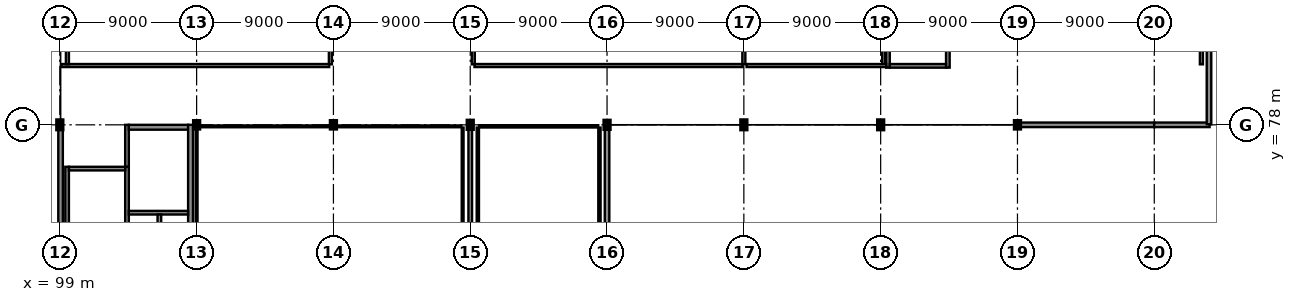
"""IFC4 building model, lengths in metres.
Left out: names, types, materials, properties, quantities, classifications, styles, units other than length and angle.
Written with IfcOpenShell. Run it as: python <this file> out.ifc"""

import sys

from ifc_helpers import new_model, si_unit, direction, frame, frame_2d, origin, origin_2d, place, context, subcontext, project, spatial, rectangle, i_section, extrude, element, fill, save


model = new_model("IFC4")
c1 = context("Model", 3, precision=1e-05, world=origin(), true_north=direction((0.0, 1.0)))
c2 = subcontext(c1, "Body", "Model", "MODEL_VIEW")
j1 = project(units=[si_unit("LENGTHUNIT", "METRE"), si_unit("PLANEANGLEUNIT", "RADIAN")], contexts=[c1])
p1 = place(None, origin())
s1 = spatial("IfcSite", under=j1, at=p1, CompositionType="ELEMENT")
p2 = place(p1, origin())
s2 = spatial("IfcBuilding", under=s1, at=p2, CompositionType="ELEMENT")
p3 = place(p2, frame((0.0, 0.0, 14.4)))
s3 = spatial("IfcBuildingStorey", under=s2, at=p3, CompositionType="ELEMENT", Elevation=14.4)
p4 = place(p3, frame((99.0, 78.0, 0.0), z_axis=(0.0, 0.0, 1.0), x_axis=(1.0, 0.0, 0.0)))
e1 = element("IfcColumn", 1, at=p4, inside=s3, PredefinedType="COLUMN", context=c2, shape_type="SweptSolid", body=[
    extrude(i_section(OverallWidth=0.3, OverallDepth=0.55, WebThickness=0.015, FlangeThickness=0.029, at=origin_2d()), origin(), (0.0, 0.0, 1.0), 4.5),
])
for number, where, z_axis, x_axis in (
    (2, (108.0, 78.0, 0.0), (0.0, 0.0, 1.0), (0.0, 1.0, 0.0)),
    (3, (117.0, 78.0, 0.0), (0.0, 0.0, 1.0), (1.0, 0.0, 0.0)),
):
    element("IfcColumn", number, at=place(p3, frame(where, z_axis=z_axis, x_axis=x_axis)), inside=s3, PredefinedType="COLUMN", context=c2, shape_type="SweptSolid", body=[
        extrude(i_section(OverallWidth=0.3, OverallDepth=0.45, WebThickness=0.014, FlangeThickness=0.026, at=origin_2d()), origin(), (0.0, 0.0, 1.0), 4.5),
    ])
for number, where, z_axis, x_axis in (
    (4, (126.0, 78.0, 0.0), (0.0, 0.0, 1.0), (1.0, 0.0, 0.0)),
    (5, (135.0, 78.0, 0.0), (0.0, 0.0, 1.0), (1.0, 0.0, 0.0)),
):
    element("IfcColumn", number, at=place(p3, frame(where, z_axis=z_axis, x_axis=x_axis)), inside=s3, PredefinedType="COLUMN", context=c2, shape_type="SweptSolid", body=[
        extrude(i_section(OverallWidth=0.3, OverallDepth=0.5, WebThickness=0.014, FlangeThickness=0.028, at=origin_2d()), origin(), (0.0, 0.0, 1.0), 4.5),
    ])
for number, where, z_axis, x_axis in (
    (6, (144.0, 78.0, 0.0), (0.0, 0.0, 1.0), (1.0, 0.0, 0.0)),
    (7, (153.0, 78.0, 0.0), (0.0, 0.0, 1.0), (0.0, 1.0, 0.0)),
):
    element("IfcColumn", number, at=place(p3, frame(where, z_axis=z_axis, x_axis=x_axis)), inside=s3, PredefinedType="COLUMN", context=c2, shape_type="SweptSolid", body=[
        extrude(i_section(OverallWidth=0.3, OverallDepth=0.55, WebThickness=0.015, FlangeThickness=0.029, at=origin_2d()), origin(), (0.0, 0.0, 1.0), 4.5),
    ])
p5 = place(p3, frame((162.0, 78.0, 0.0), z_axis=(0.0, 0.0, 1.0), x_axis=(1.0, 0.0, 0.0)))
e8 = element("IfcColumn", 8, at=p5, inside=s3, PredefinedType="COLUMN", context=c2, shape_type="SweptSolid", body=[
    extrude(i_section(OverallWidth=0.3, OverallDepth=0.45, WebThickness=0.014, FlangeThickness=0.026, at=origin_2d()), origin(), (0.0, 0.0, 1.0), 4.5),
])
p6 = place(p3, frame((135.0, 66.138, 0.0), z_axis=(0.0, 0.0, 1.0), x_axis=(0.0, 1.0, 0.0)))
e9 = element("IfcWall", 9, at=p6, inside=s3, PredefinedType="SOLIDWALL", context=c2, shape_type="SweptSolid", body=[
    extrude(rectangle(XDim=11.614, YDim=0.3, at=frame_2d((5.807, 0.0))), origin(), (0.0, 0.0, 1.0), 3.805),
])
p7 = place(p6, frame((2.252, 0.0, 0.85)))
e10 = element("IfcOpeningElement", 10, at=p7, cuts=e9, PredefinedType="OPENING", context=c2, shape_type="SweptSolid", body=[
    extrude(rectangle(XDim=2.0, YDim=2.0, at=frame_2d((1.0, 1.0))), frame((0.0, 0.165, 0.0), z_axis=(0.0, -1.0, 0.0), x_axis=(1.0, 0.0, 0.0)), (0.0, 0.0, 1.0), 0.33),
])
p8 = place(p6, frame((7.362, 0.0, 0.85)))
e11 = element("IfcOpeningElement", 11, at=p8, cuts=e9, PredefinedType="OPENING", context=c2, shape_type="SweptSolid", body=[
    extrude(rectangle(XDim=2.0, YDim=2.0, at=frame_2d((1.0, 1.0))), frame((0.0, 0.165, 0.0), z_axis=(0.0, -1.0, 0.0), x_axis=(1.0, 0.0, 0.0)), (0.0, 0.0, 1.0), 0.33),
])
p9 = place(p3, frame((162.008, 78.0, 0.0), z_axis=(0.0, 0.0, 1.0), x_axis=(1.0, 0.0, 0.0)))
e12 = element("IfcWall", 12, at=p9, inside=s3, PredefinedType="SOLIDWALL", context=c2, shape_type="SweptSolid", body=[
    extrude(rectangle(XDim=9.002, YDim=0.3, at=frame_2d((4.501, 0.0))), origin(), (0.0, 0.0, 1.0), 3.187),
])
p10 = place(p3, frame((170.99, 78.0, 0.0), z_axis=(0.0, 0.0, 1.0), x_axis=(1.0, 0.0, 0.0)))
e13 = element("IfcWall", 13, at=p10, inside=s3, PredefinedType="SOLIDWALL", context=c2, shape_type="SweptSolid", body=[
    extrude(rectangle(XDim=3.65, YDim=0.3, at=frame_2d((1.825, 0.0))), origin(), (0.0, 0.0, 1.0), 3.187),
])
p11 = place(p3, frame((174.6, 78.04, 0.0), z_axis=(0.0, 0.0, 1.0), x_axis=(0.0, 1.0, 0.0)))
e14 = element("IfcWall", 14, at=p11, inside=s3, PredefinedType="SOLIDWALL", context=c2, shape_type="SweptSolid", body=[
    extrude(rectangle(XDim=18.0, YDim=0.3, at=frame_2d((9.0, 0.0))), origin(), (0.0, 0.0, 1.0), 3.545),
])
p12 = place(p11, frame((4.1, 0.0, 0.85)))
e15 = element("IfcOpeningElement", 15, at=p12, cuts=e14, PredefinedType="OPENING", context=c2, shape_type="SweptSolid", body=[
    extrude(rectangle(XDim=2.0, YDim=2.0, at=frame_2d((1.0, 1.0))), frame((0.0, 0.165, 0.0), z_axis=(0.0, -1.0, 0.0), x_axis=(1.0, 0.0, 0.0)), (0.0, 0.0, 1.0), 0.33),
])
p13 = place(p11, frame((11.96, 0.0, 0.85)))
e16 = element("IfcOpeningElement", 16, at=p13, cuts=e14, PredefinedType="OPENING", context=c2, shape_type="SweptSolid", body=[
    extrude(rectangle(XDim=2.0, YDim=2.0, at=frame_2d((1.0, 1.0))), frame((0.0, 0.165, 0.0), z_axis=(0.0, -1.0, 0.0), x_axis=(1.0, 0.0, 0.0)), (0.0, 0.0, 1.0), 0.33),
])
p14 = place(p3, frame((99.05, 77.727, 0.0), z_axis=(0.0, 0.0, 1.0), x_axis=(0.0, -1.0, 0.0)))
e17 = element("IfcWall", 17, at=p14, inside=s3, PredefinedType="SOLIDWALL", context=c2, shape_type="SweptSolid", body=[
    extrude(rectangle(XDim=11.599, YDim=0.3, at=frame_2d((5.8, 0.0))), origin(), (0.0, 0.0, 1.0), 3.705),
])
p15 = place(p3, frame((99.48, 66.96, 0.0), z_axis=(0.0, 0.0, 1.0), x_axis=(0.0, 1.0, 0.0)))
e18 = element("IfcWall", 18, at=p15, inside=s3, PredefinedType="SHEAR", context=c2, shape_type="SweptSolid", body=[
    extrude(rectangle(XDim=8.28, YDim=0.24, at=frame_2d((4.14, 0.0))), origin(), (0.0, 0.0, 1.0), 4.31),
])
p16 = place(p3, frame((103.42, 66.96, 0.0), z_axis=(0.0, 0.0, 1.0), x_axis=(0.0, 1.0, 0.0)))
e19 = element("IfcWall", 19, at=p16, inside=s3, PredefinedType="SHEAR", context=c2, shape_type="SweptSolid", body=[
    extrude(rectangle(XDim=8.28, YDim=0.24, at=frame_2d((4.14, 0.0))), origin(), (0.0, 0.0, 1.0), 4.31),
])
p17 = place(p16, frame((6.49, 0.0, 0.0)))
e20 = element("IfcOpeningElement", 20, at=p17, cuts=e19, PredefinedType="OPENING", context=c2, shape_type="SweptSolid", body=[
    extrude(rectangle(XDim=1.3, YDim=2.2, at=frame_2d((0.65, 1.1))), frame((0.0, 0.135, 0.0), z_axis=(0.0, -1.0, 0.0), x_axis=(1.0, 0.0, 0.0)), (0.0, 0.0, 1.0), 0.27),
])
p18 = place(p3, frame((99.6, 75.12, 0.0), z_axis=(0.0, 0.0, 1.0), x_axis=(1.0, 0.0, 0.0)))
e21 = element("IfcWall", 21, at=p18, inside=s3, PredefinedType="SHEAR", context=c2, shape_type="SweptSolid", body=[
    extrude(rectangle(XDim=3.7, YDim=0.24, at=frame_2d((1.85, 0.0))), origin(), (0.0, 0.0, 1.0), 4.31),
])
p19 = place(p3, frame((153.48, 81.76, 0.0), z_axis=(0.0, 0.0, 1.0), x_axis=(0.0, 1.0, 0.0)))
e22 = element("IfcWall", 22, at=p19, inside=s3, PredefinedType="SHEAR", context=c2, shape_type="SweptSolid", body=[
    extrude(rectangle(XDim=8.28, YDim=0.24, at=frame_2d((4.14, 0.0))), origin(), (0.0, 0.0, 1.0), 4.31),
])
p20 = place(p3, frame((157.42, 81.76, 0.0), z_axis=(0.0, 0.0, 1.0), x_axis=(0.0, 1.0, 0.0)))
e23 = element("IfcWall", 23, at=p20, inside=s3, PredefinedType="SHEAR", context=c2, shape_type="SweptSolid", body=[
    extrude(rectangle(XDim=8.28, YDim=0.24, at=frame_2d((4.14, 0.0))), origin(), (0.0, 0.0, 1.0), 4.31),
])
p21 = place(p20, frame((0.49, 0.0, 0.0)))
e24 = element("IfcOpeningElement", 24, at=p21, cuts=e23, PredefinedType="OPENING", context=c2, shape_type="SweptSolid", body=[
    extrude(rectangle(XDim=1.3, YDim=2.2, at=frame_2d((0.65, 1.1))), frame((0.0, 0.135, 0.0), z_axis=(0.0, -1.0, 0.0), x_axis=(1.0, 0.0, 0.0)), (0.0, 0.0, 1.0), 0.27),
])
p22 = place(p3, frame((153.6, 81.88, 0.0), z_axis=(0.0, 0.0, 1.0), x_axis=(1.0, 0.0, 0.0)))
e25 = element("IfcWall", 25, at=p22, inside=s3, PredefinedType="SHEAR", context=c2, shape_type="SweptSolid", body=[
    extrude(rectangle(XDim=3.7, YDim=0.24, at=frame_2d((1.85, 0.0))), origin(), (0.0, 0.0, 1.0), 4.31),
])
p23 = place(p3, frame((103.42, 75.24, 0.0), z_axis=(0.0, 0.0, 1.0), x_axis=(0.0, 1.0, 0.0)))
e26 = element("IfcWall", 26, at=p23, inside=s3, PredefinedType="SHEAR", context=c2, shape_type="SweptSolid", body=[
    extrude(rectangle(XDim=2.76, YDim=0.24, at=frame_2d((1.38, 0.0))), origin(), (0.0, 0.0, 1.0), 4.16),
])
p24 = place(p3, frame((103.54, 77.84, 0.0), z_axis=(0.0, 0.0, 1.0), x_axis=(1.0, 0.0, 0.0)))
e27 = element("IfcWall", 27, at=p24, inside=s3, PredefinedType="SHEAR", context=c2, shape_type="SweptSolid", body=[
    extrude(rectangle(XDim=3.9, YDim=0.32, at=frame_2d((1.95, 0.0))), origin(), (0.0, 0.0, 1.0), 4.16),
])
p25 = place(p24, frame((1.225, 0.0, 0.0)))
e28 = element("IfcOpeningElement", 28, at=p25, cuts=e27, PredefinedType="OPENING", context=c2, shape_type="SweptSolid", body=[
    extrude(rectangle(XDim=1.45, YDim=2.2, at=frame_2d((0.725, 1.1))), frame((0.0, 0.175, 0.0), z_axis=(0.0, -1.0, 0.0), x_axis=(1.0, 0.0, 0.0)), (0.0, 0.0, 1.0), 0.35),
])
p26 = place(p3, frame((107.6, 68.96, 0.0), z_axis=(0.0, 0.0, 1.0), x_axis=(0.0, 1.0, 0.0)))
e29 = element("IfcWall", 29, at=p26, inside=s3, PredefinedType="SHEAR", context=c2, shape_type="SweptSolid", body=[
    extrude(rectangle(XDim=9.04, YDim=0.32, at=frame_2d((4.52, 0.0))), origin(), (0.0, 0.0, 1.0), 4.16),
])
p27 = place(p3, frame((103.54, 72.22, 0.0), z_axis=(0.0, 0.0, 1.0), x_axis=(1.0, 0.0, 0.0)))
e30 = element("IfcWall", 30, at=p27, inside=s3, PredefinedType="SHEAR", context=c2, shape_type="SweptSolid", body=[
    extrude(rectangle(XDim=3.9, YDim=0.24, at=frame_2d((1.95, 0.0))), origin(), (0.0, 0.0, 1.0), 4.31),
])
p28 = place(p27, frame((0.385, 0.0, 0.0)))
e31 = element("IfcOpeningElement", 31, at=p28, cuts=e30, PredefinedType="OPENING", context=c2, shape_type="SweptSolid", body=[
    extrude(rectangle(XDim=1.3, YDim=2.2, at=frame_2d((0.65, 1.1))), frame((0.0, 0.135, 0.0), z_axis=(0.0, -1.0, 0.0), x_axis=(1.0, 0.0, 0.0)), (0.0, 0.0, 1.0), 0.27),
])
p29 = place(p27, frame((2.335, 0.0, 0.0)))
e32 = element("IfcOpeningElement", 32, at=p29, cuts=e30, PredefinedType="OPENING", context=c2, shape_type="SweptSolid", body=[
    extrude(rectangle(XDim=1.3, YDim=2.2, at=frame_2d((0.65, 1.1))), frame((0.0, 0.135, 0.0), z_axis=(0.0, -1.0, 0.0), x_axis=(1.0, 0.0, 0.0)), (0.0, 0.0, 1.0), 0.27),
])
p30 = place(p3, frame((105.55, 69.2, 0.0), z_axis=(0.0, 0.0, 1.0), x_axis=(0.0, 1.0, 0.0)))
e33 = element("IfcWall", 33, at=p30, inside=s3, PredefinedType="SHEAR", context=c2, shape_type="SweptSolid", body=[
    extrude(rectangle(XDim=2.9, YDim=0.24, at=frame_2d((1.45, 0.0))), origin(), (0.0, 0.0, 1.0), 4.31),
])
p31 = place(p3, frame((126.0, 66.008, 0.0), z_axis=(0.0, 0.0, 1.0), x_axis=(0.0, 1.0, 0.0)))
e34 = element("IfcWall", 34, at=p31, inside=s3, PredefinedType="SHEAR", context=c2, shape_type="SweptSolid", body=[
    extrude(rectangle(XDim=11.744, YDim=0.24, at=frame_2d((5.872, 0.0))), origin(), (0.0, 0.0, 1.0), 3.845),
])
p32 = place(p3, frame((116.72, 81.9, 0.0), z_axis=(0.0, 0.0, 1.0), x_axis=(-1.0, 0.0, 0.0)))
e35 = element("IfcWall", 35, at=p32, inside=s3, PredefinedType="PARTITIONING", context=c2, shape_type="SweptSolid", body=[
    extrude(rectangle(XDim=17.595, YDim=0.2, at=frame_2d((8.797, 0.0))), origin(), (0.0, 0.0, 1.0), 4.14),
])
p33 = place(p32, frame((7.947, 0.0, 0.0)))
e36 = element("IfcOpeningElement", 36, at=p33, cuts=e35, PredefinedType="OPENING", context=c2, shape_type="SweptSolid", body=[
    extrude(rectangle(XDim=1.7, YDim=2.4, at=frame_2d((0.85, 1.2))), frame((0.0, 0.115, 0.0), z_axis=(0.0, -1.0, 0.0), x_axis=(1.0, 0.0, 0.0)), (0.0, 0.0, 1.0), 0.23),
])
p34 = place(p3, frame((99.5, 81.98, 0.0), z_axis=(0.0, 0.0, 1.0), x_axis=(0.0, 1.0, 0.0)))
e37 = element("IfcWall", 37, at=p34, inside=s3, PredefinedType="PARTITIONING", context=c2, shape_type="SweptSolid", body=[
    extrude(rectangle(XDim=13.945, YDim=0.2, at=frame_2d((6.973, 0.0))), origin(), (0.0, 0.0, 1.0), 4.14),
])
p35 = place(p3, frame((116.8, 95.777, 0.0), z_axis=(0.0, 0.0, 1.0), x_axis=(0.0, -1.0, 0.0)))
e38 = element("IfcWall", 38, at=p35, inside=s3, PredefinedType="PARTITIONING", context=c2, shape_type="SweptSolid", body=[
    extrude(rectangle(XDim=13.797, YDim=0.2, at=frame_2d((6.898, 0.0))), origin(), (0.0, 0.0, 1.0), 3.505),
])
p36 = place(p3, frame((126.2, 81.98, 0.0), z_axis=(0.0, 0.0, 1.0), x_axis=(0.0, 1.0, 0.0)))
e39 = element("IfcWall", 39, at=p36, inside=s3, PredefinedType="PARTITIONING", context=c2, shape_type="SweptSolid", body=[
    extrude(rectangle(XDim=13.44, YDim=0.2, at=frame_2d((6.72, 0.0))), origin(), (0.0, 0.0, 1.0), 3.405),
])
p37 = place(p3, frame((144.0, 95.42, 0.0), z_axis=(0.0, 0.0, 1.0), x_axis=(0.0, -1.0, 0.0)))
e40 = element("IfcWall", 40, at=p37, inside=s3, PredefinedType="PARTITIONING", context=c2, shape_type="SweptSolid", body=[
    extrude(rectangle(XDim=13.44, YDim=0.2, at=frame_2d((6.72, 0.0))), origin(), (0.0, 0.0, 1.0), 3.545),
])
p38 = place(p3, frame((143.92, 81.9, 0.0), z_axis=(0.0, 0.0, 1.0), x_axis=(-1.0, 0.0, 0.0)))
e41 = element("IfcWall", 41, at=p38, inside=s3, PredefinedType="PARTITIONING", context=c2, shape_type="SweptSolid", body=[
    extrude(rectangle(XDim=17.64, YDim=0.2, at=frame_2d((8.82, 0.0))), origin(), (0.0, 0.0, 1.0), 4.14),
])
p39 = place(p38, frame((7.82, 0.0, 0.0)))
e42 = element("IfcOpeningElement", 42, at=p39, cuts=e41, PredefinedType="OPENING", context=c2, shape_type="SweptSolid", body=[
    extrude(rectangle(XDim=2.0, YDim=2.6, at=frame_2d((1.0, 1.3))), frame((0.0, 0.115, 0.0), z_axis=(0.0, -1.0, 0.0), x_axis=(1.0, 0.0, 0.0)), (0.0, 0.0, 1.0), 0.23),
])
p40 = place(p3, frame((153.2, 95.727, 0.0), z_axis=(0.0, 0.0, 1.0), x_axis=(0.0, -1.0, 0.0)))
e43 = element("IfcWall", 43, at=p40, inside=s3, PredefinedType="PARTITIONING", context=c2, shape_type="SweptSolid", body=[
    extrude(rectangle(XDim=13.747, YDim=0.2, at=frame_2d((6.874, 0.0))), origin(), (0.0, 0.0, 1.0), 3.495),
])
p41 = place(p3, frame((153.365, 81.9, 0.0), z_axis=(0.0, 0.0, 1.0), x_axis=(-1.0, 0.0, 0.0)))
e44 = element("IfcWall", 44, at=p41, inside=s3, PredefinedType="PARTITIONING", context=c2, shape_type="SweptSolid", body=[
    extrude(rectangle(XDim=9.185, YDim=0.2, at=frame_2d((4.593, 0.0))), origin(), (0.0, 0.0, 1.0), 4.14),
])
p42 = place(p41, frame((3.643, 0.0, 0.0)))
e45 = element("IfcOpeningElement", 45, at=p42, cuts=e44, PredefinedType="OPENING", context=c2, shape_type="SweptSolid", body=[
    extrude(rectangle(XDim=1.9, YDim=2.5, at=frame_2d((0.95, 1.25))), frame((0.0, 0.115, 0.0), z_axis=(0.0, -1.0, 0.0), x_axis=(1.0, 0.0, 0.0)), (0.0, 0.0, 1.0), 0.23),
])
p43 = place(p3, frame((174.1, 95.855, 0.0), z_axis=(0.0, 0.0, 1.0), x_axis=(0.0, -1.0, 0.0)))
e46 = element("IfcWall", 46, at=p43, inside=s3, PredefinedType="PARTITIONING", context=c2, shape_type="SweptSolid", body=[
    extrude(rectangle(XDim=13.875, YDim=0.2, at=frame_2d((6.938, 0.0))), origin(), (0.0, 0.0, 1.0), 4.14),
])
p44 = place(p3, frame((108.0, 66.48, 0.0), z_axis=(0.0, 0.0, 1.0), x_axis=(0.0, 1.0, 0.0)))
e47 = element("IfcWall", 47, at=p44, inside=s3, PredefinedType="PARTITIONING", context=c2, shape_type="SweptSolid", body=[
    extrude(rectangle(XDim=11.34, YDim=0.12, at=frame_2d((5.67, 0.0))), origin(), (0.0, 0.0, 1.0), 3.645),
])
p45 = place(p3, frame((107.823, 77.9, 0.0), z_axis=(0.0, 0.0, 1.0), x_axis=(1.0, 0.0, 0.0)))
e48 = element("IfcWall", 48, at=p45, inside=s3, PredefinedType="PARTITIONING", context=c2, shape_type="SweptSolid", body=[
    extrude(rectangle(XDim=17.597, YDim=0.12, at=frame_2d((8.798, 0.0))), origin(), (0.0, 0.0, 1.0), 3.655),
])
p46 = place(p45, frame((7.645, 0.0, 0.0)))
e49 = element("IfcOpeningElement", 49, at=p46, cuts=e48, PredefinedType="OPENING", context=c2, shape_type="SweptSolid", body=[
    extrude(rectangle(XDim=0.9, YDim=2.1, at=frame_2d((0.45, 1.05))), frame((0.0, 0.075, 0.0), z_axis=(0.0, -1.0, 0.0), x_axis=(1.0, 0.0, 0.0)), (0.0, 0.0, 1.0), 0.15),
])
p47 = place(p3, frame((125.5, 77.82, 0.0), z_axis=(0.0, 0.0, 1.0), x_axis=(0.0, -1.0, 0.0)))
e50 = element("IfcWall", 50, at=p47, inside=s3, PredefinedType="PARTITIONING", context=c2, shape_type="SweptSolid", body=[
    extrude(rectangle(XDim=11.745, YDim=0.12, at=frame_2d((5.873, 0.0))), origin(), (0.0, 0.0, 1.0), 4.14),
])
p48 = place(p3, frame((126.5, 66.075, 0.0), z_axis=(0.0, 0.0, 1.0), x_axis=(0.0, 1.0, 0.0)))
e51 = element("IfcWall", 51, at=p48, inside=s3, PredefinedType="PARTITIONING", context=c2, shape_type="SweptSolid", body=[
    extrude(rectangle(XDim=11.745, YDim=0.15, at=frame_2d((5.873, 0.0))), origin(), (0.0, 0.0, 1.0), 4.14),
])
p49 = place(p3, frame((126.58, 77.9, 0.0), z_axis=(0.0, 0.0, 1.0), x_axis=(1.0, 0.0, 0.0)))
e52 = element("IfcWall", 52, at=p49, inside=s3, PredefinedType="PARTITIONING", context=c2, shape_type="SweptSolid", body=[
    extrude(rectangle(XDim=7.84, YDim=0.15, at=frame_2d((3.92, 0.0))), origin(), (0.0, 0.0, 1.0), 3.655),
])
p50 = place(p49, frame((3.395, 0.0, 0.0)))
e53 = element("IfcOpeningElement", 53, at=p50, cuts=e52, PredefinedType="OPENING", context=c2, shape_type="SweptSolid", body=[
    extrude(rectangle(XDim=1.05, YDim=2.25, at=frame_2d((0.525, 1.125))), frame((0.0, 0.09, 0.0), z_axis=(0.0, -1.0, 0.0), x_axis=(1.0, 0.0, 0.0)), (0.0, 0.0, 1.0), 0.18),
])
p51 = place(p3, frame((134.5, 77.82, 0.0), z_axis=(0.0, 0.0, 1.0), x_axis=(0.0, -1.0, 0.0)))
e54 = element("IfcWall", 54, at=p51, inside=s3, PredefinedType="PARTITIONING", context=c2, shape_type="SweptSolid", body=[
    extrude(rectangle(XDim=11.745, YDim=0.15, at=frame_2d((5.873, 0.0))), origin(), (0.0, 0.0, 1.0), 4.14),
])
p52 = place(p8, origin())
e55 = element("IfcWindow", 55, at=p52, inside=s3, PartitioningType="SINGLE_PANEL", PredefinedType="WINDOW", context=c2, shape_type="SweptSolid", body=[
    extrude(rectangle(XDim=2.0, YDim=2.0, at=frame_2d((1.0, 1.0))), frame((0.0, 0.03, 0.0), z_axis=(0.0, -1.0, 0.0), x_axis=(1.0, 0.0, 0.0)), (0.0, 0.0, 1.0), 0.06),
])
fill(e11, e55)
p53 = place(p12, origin())
e56 = element("IfcWindow", 56, at=p53, inside=s3, PartitioningType="SINGLE_PANEL", PredefinedType="WINDOW", context=c2, shape_type="SweptSolid", body=[
    extrude(rectangle(XDim=2.0, YDim=2.0, at=frame_2d((1.0, 1.0))), frame((0.0, 0.03, 0.0), z_axis=(0.0, -1.0, 0.0), x_axis=(1.0, 0.0, 0.0)), (0.0, 0.0, 1.0), 0.06),
])
fill(e15, e56)
p54 = place(p17, frame((1.3, 0.0, 0.0), z_axis=(0.0, 0.0, 1.0), x_axis=(-1.0, 0.0, 0.0)))
e57 = element("IfcDoor", 57, at=p54, inside=s3, OperationType="SINGLE_SWING_RIGHT", PredefinedType="DOOR", context=c2, shape_type="SweptSolid", body=[
    extrude(rectangle(XDim=1.3, YDim=2.2, at=frame_2d((0.65, 1.1))), frame((0.0, 0.025, 0.0), z_axis=(0.0, -1.0, 0.0), x_axis=(1.0, 0.0, 0.0)), (0.0, 0.0, 1.0), 0.05),
])
fill(e20, e57)
p55 = place(p21, frame((1.3, 0.0, 0.0), z_axis=(0.0, 0.0, 1.0), x_axis=(-1.0, 0.0, 0.0)))
e58 = element("IfcDoor", 58, at=p55, inside=s3, OperationType="SINGLE_SWING_RIGHT", PredefinedType="DOOR", context=c2, shape_type="SweptSolid", body=[
    extrude(rectangle(XDim=1.3, YDim=2.2, at=frame_2d((0.65, 1.1))), frame((0.0, 0.025, 0.0), z_axis=(0.0, -1.0, 0.0), x_axis=(1.0, 0.0, 0.0)), (0.0, 0.0, 1.0), 0.05),
])
fill(e24, e58)
p56 = place(p25, origin())
e59 = element("IfcDoor", 59, at=p56, inside=s3, OperationType="DOUBLE_DOOR_SINGLE_SWING", PredefinedType="DOOR", context=c2, shape_type="SweptSolid", body=[
    extrude(rectangle(XDim=1.45, YDim=2.2, at=frame_2d((0.725, 1.1))), frame((0.0, 0.025, 0.0), z_axis=(0.0, -1.0, 0.0), x_axis=(1.0, 0.0, 0.0)), (0.0, 0.0, 1.0), 0.05),
])
fill(e28, e59)
p57 = place(p28, origin())
e60 = element("IfcDoor", 60, at=p57, inside=s3, OperationType="DOUBLE_DOOR_SLIDING", PredefinedType="DOOR", context=c2, shape_type="SweptSolid", body=[
    extrude(rectangle(XDim=1.3, YDim=2.2, at=frame_2d((0.65, 1.1))), frame((0.0, 0.025, 0.0), z_axis=(0.0, -1.0, 0.0), x_axis=(1.0, 0.0, 0.0)), (0.0, 0.0, 1.0), 0.05),
])
fill(e31, e60)
p58 = place(p29, origin())
e61 = element("IfcDoor", 61, at=p58, inside=s3, OperationType="DOUBLE_DOOR_SLIDING", PredefinedType="DOOR", context=c2, shape_type="SweptSolid", body=[
    extrude(rectangle(XDim=1.3, YDim=2.2, at=frame_2d((0.65, 1.1))), frame((0.0, 0.025, 0.0), z_axis=(0.0, -1.0, 0.0), x_axis=(1.0, 0.0, 0.0)), (0.0, 0.0, 1.0), 0.05),
])
fill(e32, e61)
p59 = place(p33, frame((1.7, 0.0, 0.0), z_axis=(0.0, 0.0, 1.0), x_axis=(-1.0, 0.0, 0.0)))
e62 = element("IfcDoor", 62, at=p59, inside=s3, OperationType="DOUBLE_DOOR_SINGLE_SWING", PredefinedType="DOOR", context=c2, shape_type="SweptSolid", body=[
    extrude(rectangle(XDim=1.7, YDim=2.4, at=frame_2d((0.85, 1.2))), frame((0.0, 0.025, 0.0), z_axis=(0.0, -1.0, 0.0), x_axis=(1.0, 0.0, 0.0)), (0.0, 0.0, 1.0), 0.05),
])
fill(e36, e62)
p60 = place(p39, origin())
e63 = element("IfcDoor", 63, at=p60, inside=s3, OperationType="DOUBLE_DOOR_SINGLE_SWING", PredefinedType="DOOR", context=c2, shape_type="SweptSolid", body=[
    extrude(rectangle(XDim=2.0, YDim=2.6, at=frame_2d((1.0, 1.3))), frame((0.0, 0.025, 0.0), z_axis=(0.0, -1.0, 0.0), x_axis=(1.0, 0.0, 0.0)), (0.0, 0.0, 1.0), 0.05),
])
fill(e42, e63)
p61 = place(p42, frame((1.9, 0.0, 0.0), z_axis=(0.0, 0.0, 1.0), x_axis=(-1.0, 0.0, 0.0)))
e64 = element("IfcDoor", 64, at=p61, inside=s3, OperationType="DOUBLE_DOOR_SINGLE_SWING", PredefinedType="DOOR", context=c2, shape_type="SweptSolid", body=[
    extrude(rectangle(XDim=1.9, YDim=2.5, at=frame_2d((0.95, 1.25))), frame((0.0, 0.025, 0.0), z_axis=(0.0, -1.0, 0.0), x_axis=(1.0, 0.0, 0.0)), (0.0, 0.0, 1.0), 0.05),
])
fill(e45, e64)
p62 = place(p46, origin())
e65 = element("IfcDoor", 65, at=p62, inside=s3, OperationType="SINGLE_SWING_RIGHT", PredefinedType="DOOR", context=c2, shape_type="SweptSolid", body=[
    extrude(rectangle(XDim=0.9, YDim=2.1, at=frame_2d((0.45, 1.05))), frame((0.0, 0.025, 0.0), z_axis=(0.0, -1.0, 0.0), x_axis=(1.0, 0.0, 0.0)), (0.0, 0.0, 1.0), 0.05),
])
fill(e49, e65)
p63 = place(p50, frame((1.05, 0.0, 0.0), z_axis=(0.0, 0.0, 1.0), x_axis=(-1.0, 0.0, 0.0)))
e66 = element("IfcDoor", 66, at=p63, inside=s3, OperationType="SINGLE_SWING_LEFT", PredefinedType="DOOR", context=c2, shape_type="SweptSolid", body=[
    extrude(rectangle(XDim=1.05, YDim=2.25, at=frame_2d((0.525, 1.125))), frame((0.0, 0.025, 0.0), z_axis=(0.0, -1.0, 0.0), x_axis=(1.0, 0.0, 0.0)), (0.0, 0.0, 1.0), 0.05),
])
fill(e53, e66)
save(model, sys.argv[1])
